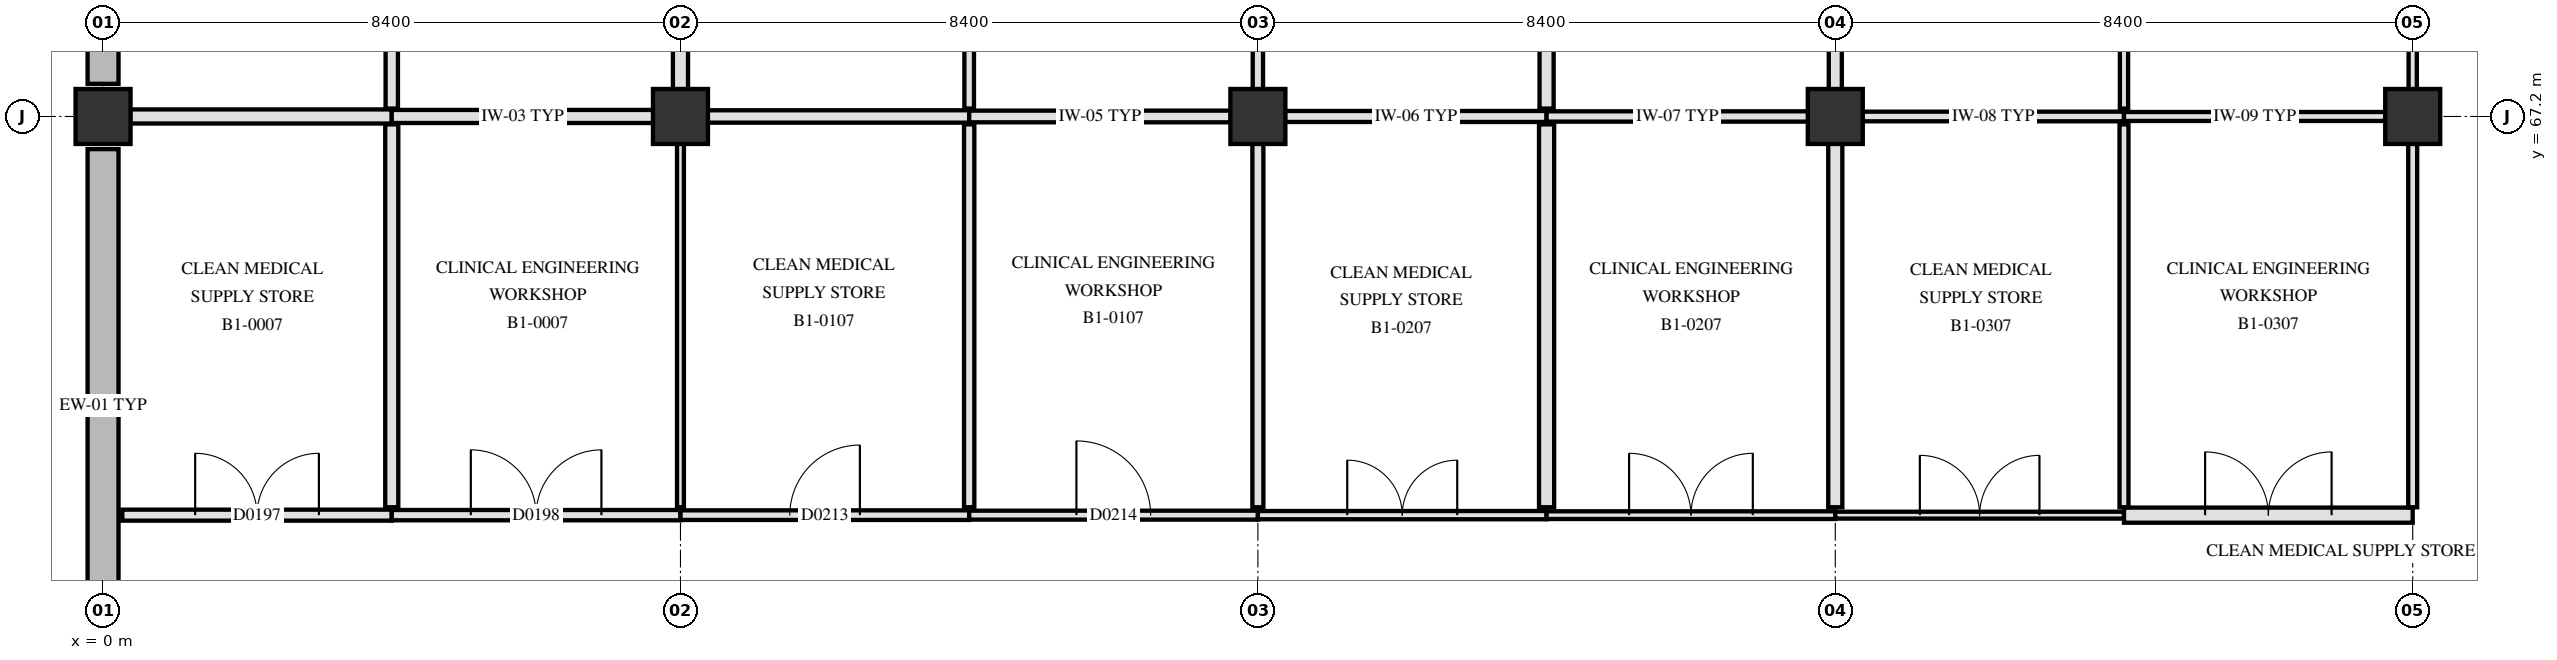
"""IFC4 building model, lengths in metres.
Left out: names, types, materials, properties, quantities, classifications, styles, units other than length and angle.
Written with IfcOpenShell. Run it as: python <this file> out.ifc"""

import sys

from ifc_helpers import new_model, si_unit, direction, frame, frame_2d, origin, origin_2d, place, context, subcontext, project, spatial, rectangle, extrude, element, fill, save


model = new_model("IFC4")
c1 = context("Model", 3, precision=1e-05, world=origin(), true_north=direction((0.0, 1.0)))
c2 = subcontext(c1, "Body", "Model", "MODEL_VIEW")
j1 = project(units=[si_unit("LENGTHUNIT", "METRE"), si_unit("PLANEANGLEUNIT", "RADIAN")], contexts=[c1])
p1 = place(None, origin())
s1 = spatial("IfcSite", under=j1, at=p1, CompositionType="ELEMENT")
p2 = place(p1, origin())
s2 = spatial("IfcBuilding", under=s1, at=p2, CompositionType="ELEMENT")
p3 = place(p2, frame((0.0, 0.0, -5.4)))
s3 = spatial("IfcBuildingStorey", under=s2, at=p3, CompositionType="ELEMENT", Elevation=-5.4)
for number, where, z_axis, x_axis in (
    (1, (0.0, 67.2, 0.0), (0.0, 0.0, 1.0), (1.0, 0.0, 0.0)),
    (2, (8.4, 67.2, 0.0), (0.0, 0.0, 1.0), (1.0, 0.0, 0.0)),
    (3, (16.8, 67.2, 0.0), (0.0, 0.0, 1.0), (1.0, 0.0, 0.0)),
    (4, (25.2, 67.2, 0.0), (0.0, 0.0, 1.0), (1.0, 0.0, 0.0)),
    (5, (33.6, 67.2, 0.0), (0.0, 0.0, 1.0), (1.0, 0.0, 0.0)),
):
    element("IfcColumn", number, at=place(p3, frame(where, z_axis=z_axis, x_axis=x_axis)), inside=s3, PredefinedType="COLUMN", context=c2, shape_type="SweptSolid", body=[
        extrude(rectangle(XDim=0.8, YDim=0.8, at=origin_2d()), origin(), (0.0, 0.0, 1.0), 5.4),
    ])
p4 = place(p3, frame((0.0, 59.275, 0.0), z_axis=(0.0, 0.0, 1.0), x_axis=(0.0, 1.0, 0.0)))
e6 = element("IfcWall", 6, at=p4, inside=s3, PredefinedType="SOLIDWALL", context=c2, shape_type="SweptSolid", body=[
    extrude(rectangle(XDim=7.45, YDim=0.45, at=frame_2d((3.725, 0.0))), origin(), (0.0, 0.0, 1.0), 5.08),
])
p5 = place(p3, frame((0.0, 67.675, 0.0), z_axis=(0.0, 0.0, 1.0), x_axis=(0.0, 1.0, 0.0)))
e7 = element("IfcWall", 7, at=p5, inside=s3, PredefinedType="SOLIDWALL", context=c2, shape_type="SweptSolid", body=[
    extrude(rectangle(XDim=7.45, YDim=0.45, at=frame_2d((3.725, 0.0))), origin(), (0.0, 0.0, 1.0), 5.08),
])
p6 = place(p3, frame((0.28, 61.4, 0.0), z_axis=(0.0, 0.0, 1.0), x_axis=(1.0, 0.0, 0.0)))
e8 = element("IfcWall", 8, at=p6, inside=s3, PredefinedType="PARTITIONING", context=c2, shape_type="SweptSolid", body=[
    extrude(rectangle(XDim=3.92, YDim=0.16, at=frame_2d((1.96, 0.0))), origin(), (0.0, 0.0, 1.0), 5.07),
])
p7 = place(p6, frame((1.06, 0.0, 0.0)))
e9 = element("IfcOpeningElement", 9, at=p7, cuts=e8, PredefinedType="OPENING", context=c2, shape_type="SweptSolid", body=[
    extrude(rectangle(XDim=1.8, YDim=2.25, at=frame_2d((0.9, 1.125))), frame((0.0, 0.09, 0.0), z_axis=(0.0, -1.0, 0.0), x_axis=(1.0, 0.0, 0.0)), (0.0, 0.0, 1.0), 0.18),
])
p8 = place(p3, frame((4.2, 61.4, 0.0), z_axis=(0.0, 0.0, 1.0), x_axis=(1.0, 0.0, 0.0)))
e10 = element("IfcWall", 10, at=p8, inside=s3, PredefinedType="PARTITIONING", context=c2, shape_type="SweptSolid", body=[
    extrude(rectangle(XDim=4.2, YDim=0.15, at=frame_2d((2.1, 0.0))), origin(), (0.0, 0.0, 1.0), 4.47),
])
p9 = place(p8, frame((1.15, 0.0, 0.0)))
e11 = element("IfcOpeningElement", 11, at=p9, cuts=e10, PredefinedType="OPENING", context=c2, shape_type="SweptSolid", body=[
    extrude(rectangle(XDim=1.9, YDim=2.3, at=frame_2d((0.95, 1.15))), frame((0.0, 0.085, 0.0), z_axis=(0.0, -1.0, 0.0), x_axis=(1.0, 0.0, 0.0)), (0.0, 0.0, 1.0), 0.17),
])
p10 = place(p3, frame((8.4, 61.4, 0.0), z_axis=(0.0, 0.0, 1.0), x_axis=(1.0, 0.0, 0.0)))
e12 = element("IfcWall", 12, at=p10, inside=s3, PredefinedType="PARTITIONING", context=c2, shape_type="SweptSolid", body=[
    extrude(rectangle(XDim=4.2, YDim=0.14, at=frame_2d((2.1, 0.0))), origin(), (0.0, 0.0, 1.0), 4.47),
])
p11 = place(p10, frame((1.59, 0.0, 0.0)))
e13 = element("IfcOpeningElement", 13, at=p11, cuts=e12, PredefinedType="OPENING", context=c2, shape_type="SweptSolid", body=[
    extrude(rectangle(XDim=1.02, YDim=2.12, at=frame_2d((0.51, 1.06))), frame((0.0, 0.08, 0.0), z_axis=(0.0, -1.0, 0.0), x_axis=(1.0, 0.0, 0.0)), (0.0, 0.0, 1.0), 0.16),
])
p12 = place(p3, frame((12.6, 61.4, 0.0), z_axis=(0.0, 0.0, 1.0), x_axis=(1.0, 0.0, 0.0)))
e14 = element("IfcWall", 14, at=p12, inside=s3, PredefinedType="PARTITIONING", context=c2, shape_type="SweptSolid", body=[
    extrude(rectangle(XDim=4.2, YDim=0.13, at=frame_2d((2.1, 0.0))), origin(), (0.0, 0.0, 1.0), 4.47),
])
p13 = place(p12, frame((1.56, 0.0, 0.0)))
e15 = element("IfcOpeningElement", 15, at=p13, cuts=e14, PredefinedType="OPENING", context=c2, shape_type="SweptSolid", body=[
    extrude(rectangle(XDim=1.08, YDim=2.12, at=frame_2d((0.54, 1.06))), frame((0.0, 0.075, 0.0), z_axis=(0.0, -1.0, 0.0), x_axis=(1.0, 0.0, 0.0)), (0.0, 0.0, 1.0), 0.15),
])
p14 = place(p3, frame((16.8, 61.4, 0.0), z_axis=(0.0, 0.0, 1.0), x_axis=(1.0, 0.0, 0.0)))
e16 = element("IfcWall", 16, at=p14, inside=s3, PredefinedType="PARTITIONING", context=c2, shape_type="SweptSolid", body=[
    extrude(rectangle(XDim=4.2, YDim=0.12, at=frame_2d((2.1, 0.0))), origin(), (0.0, 0.0, 1.0), 4.47),
])
p15 = place(p14, frame((1.3, 0.0, 0.0)))
e17 = element("IfcOpeningElement", 17, at=p15, cuts=e16, PredefinedType="OPENING", context=c2, shape_type="SweptSolid", body=[
    extrude(rectangle(XDim=1.6, YDim=2.25, at=frame_2d((0.8, 1.125))), frame((0.0, 0.07, 0.0), z_axis=(0.0, -1.0, 0.0), x_axis=(1.0, 0.0, 0.0)), (0.0, 0.0, 1.0), 0.14),
])
p16 = place(p3, frame((21.0, 61.4, 0.0), z_axis=(0.0, 0.0, 1.0), x_axis=(1.0, 0.0, 0.0)))
e18 = element("IfcWall", 18, at=p16, inside=s3, PredefinedType="PARTITIONING", context=c2, shape_type="SweptSolid", body=[
    extrude(rectangle(XDim=4.2, YDim=0.112, at=frame_2d((2.1, 0.0))), origin(), (0.0, 0.0, 1.0), 4.47),
])
p17 = place(p16, frame((1.2, 0.0, 0.0)))
e19 = element("IfcOpeningElement", 19, at=p17, cuts=e18, PredefinedType="OPENING", context=c2, shape_type="SweptSolid", body=[
    extrude(rectangle(XDim=1.8, YDim=2.25, at=frame_2d((0.9, 1.125))), frame((0.0, 0.066, 0.0), z_axis=(0.0, -1.0, 0.0), x_axis=(1.0, 0.0, 0.0)), (0.0, 0.0, 1.0), 0.132),
])
p18 = place(p3, frame((25.2, 61.4, 0.0), z_axis=(0.0, 0.0, 1.0), x_axis=(1.0, 0.0, 0.0)))
e20 = element("IfcWall", 20, at=p18, inside=s3, PredefinedType="PARTITIONING", context=c2, shape_type="SweptSolid", body=[
    extrude(rectangle(XDim=4.2, YDim=0.1, at=frame_2d((2.1, 0.0))), origin(), (0.0, 0.0, 1.0), 4.47),
])
p19 = place(p18, frame((1.23, 0.0, 0.0)))
e21 = element("IfcOpeningElement", 21, at=p19, cuts=e20, PredefinedType="OPENING", context=c2, shape_type="SweptSolid", body=[
    extrude(rectangle(XDim=1.74, YDim=2.24, at=frame_2d((0.87, 1.12))), frame((0.0, 0.06, 0.0), z_axis=(0.0, -1.0, 0.0), x_axis=(1.0, 0.0, 0.0)), (0.0, 0.0, 1.0), 0.12),
])
p20 = place(p3, frame((29.4, 61.4, 0.0), z_axis=(0.0, 0.0, 1.0), x_axis=(1.0, 0.0, 0.0)))
e22 = element("IfcWall", 22, at=p20, inside=s3, PredefinedType="PARTITIONING", context=c2, shape_type="SweptSolid", body=[
    extrude(rectangle(XDim=4.2, YDim=0.22, at=frame_2d((2.1, 0.0))), origin(), (0.0, 0.0, 1.0), 4.47),
])
p21 = place(p20, frame((1.18, 0.0, 0.0)))
e23 = element("IfcOpeningElement", 23, at=p21, cuts=e22, PredefinedType="OPENING", context=c2, shape_type="SweptSolid", body=[
    extrude(rectangle(XDim=1.84, YDim=2.28, at=frame_2d((0.92, 1.14))), frame((0.0, 0.12, 0.0), z_axis=(0.0, -1.0, 0.0), x_axis=(1.0, 0.0, 0.0)), (0.0, 0.0, 1.0), 0.24),
])
p22 = place(p3, frame((0.395, 67.2, 0.0), z_axis=(0.0, 0.0, 1.0), x_axis=(1.0, 0.0, 0.0)))
e24 = element("IfcWall", 24, at=p22, inside=s3, PredefinedType="PARTITIONING", context=c2, shape_type="SweptSolid", body=[
    extrude(rectangle(XDim=3.805, YDim=0.205, at=frame_2d((1.902, 0.0))), origin(), (0.0, 0.0, 1.0), 4.42),
])
p23 = place(p3, frame((4.2, 67.2, 0.0), z_axis=(0.0, 0.0, 1.0), x_axis=(1.0, 0.0, 0.0)))
e25 = element("IfcWall", 25, at=p23, inside=s3, PredefinedType="PARTITIONING", context=c2, shape_type="SweptSolid", body=[
    extrude(rectangle(XDim=3.805, YDim=0.19, at=frame_2d((1.902, 0.0))), origin(), (0.0, 0.0, 1.0), 4.42),
])
p24 = place(p3, frame((8.795, 67.2, 0.0), z_axis=(0.0, 0.0, 1.0), x_axis=(1.0, 0.0, 0.0)))
e26 = element("IfcWall", 26, at=p24, inside=s3, PredefinedType="PARTITIONING", context=c2, shape_type="SweptSolid", body=[
    extrude(rectangle(XDim=3.805, YDim=0.18, at=frame_2d((1.903, 0.0))), origin(), (0.0, 0.0, 1.0), 4.42),
])
p25 = place(p3, frame((12.6, 67.2, 0.0), z_axis=(0.0, 0.0, 1.0), x_axis=(1.0, 0.0, 0.0)))
e27 = element("IfcWall", 27, at=p25, inside=s3, PredefinedType="PARTITIONING", context=c2, shape_type="SweptSolid", body=[
    extrude(rectangle(XDim=3.805, YDim=0.17, at=frame_2d((1.902, 0.0))), origin(), (0.0, 0.0, 1.0), 4.42),
])
p26 = place(p3, frame((17.195, 67.2, 0.0), z_axis=(0.0, 0.0, 1.0), x_axis=(1.0, 0.0, 0.0)))
e28 = element("IfcWall", 28, at=p26, inside=s3, PredefinedType="PARTITIONING", context=c2, shape_type="SweptSolid", body=[
    extrude(rectangle(XDim=3.805, YDim=0.16, at=frame_2d((1.902, 0.0))), origin(), (0.0, 0.0, 1.0), 4.42),
])
p27 = place(p3, frame((21.0, 67.2, 0.0), z_axis=(0.0, 0.0, 1.0), x_axis=(1.0, 0.0, 0.0)))
e29 = element("IfcWall", 29, at=p27, inside=s3, PredefinedType="PARTITIONING", context=c2, shape_type="SweptSolid", body=[
    extrude(rectangle(XDim=3.805, YDim=0.15, at=frame_2d((1.902, 0.0))), origin(), (0.0, 0.0, 1.0), 4.42),
])
p28 = place(p3, frame((25.595, 67.2, 0.0), z_axis=(0.0, 0.0, 1.0), x_axis=(1.0, 0.0, 0.0)))
e30 = element("IfcWall", 30, at=p28, inside=s3, PredefinedType="PARTITIONING", context=c2, shape_type="SweptSolid", body=[
    extrude(rectangle(XDim=3.805, YDim=0.14, at=frame_2d((1.902, 0.0))), origin(), (0.0, 0.0, 1.0), 4.42),
])
p29 = place(p3, frame((29.4, 67.2, 0.0), z_axis=(0.0, 0.0, 1.0), x_axis=(1.0, 0.0, 0.0)))
e31 = element("IfcWall", 31, at=p29, inside=s3, PredefinedType="PARTITIONING", context=c2, shape_type="SweptSolid", body=[
    extrude(rectangle(XDim=3.805, YDim=0.13, at=frame_2d((1.903, 0.0))), origin(), (0.0, 0.0, 1.0), 4.42),
])
p30 = place(p3, frame((4.2, 61.515, 0.0), z_axis=(0.0, 0.0, 1.0), x_axis=(0.0, 1.0, 0.0)))
e32 = element("IfcWall", 32, at=p30, inside=s3, PredefinedType="PARTITIONING", context=c2, shape_type="SweptSolid", body=[
    extrude(rectangle(XDim=5.57, YDim=0.19, at=frame_2d((2.785, 0.0))), origin(), (0.0, 0.0, 1.0), 4.42),
])
p31 = place(p3, frame((4.2, 67.315, 0.0), z_axis=(0.0, 0.0, 1.0), x_axis=(0.0, 1.0, 0.0)))
e33 = element("IfcWall", 33, at=p31, inside=s3, PredefinedType="PARTITIONING", context=c2, shape_type="SweptSolid", body=[
    extrude(rectangle(XDim=8.17, YDim=0.18, at=frame_2d((4.085, 0.0))), origin(), (0.0, 0.0, 1.0), 4.42),
])
p32 = place(p3, frame((8.4, 61.515, 0.0), z_axis=(0.0, 0.0, 1.0), x_axis=(0.0, 1.0, 0.0)))
e34 = element("IfcWall", 34, at=p32, inside=s3, PredefinedType="PARTITIONING", context=c2, shape_type="SweptSolid", body=[
    extrude(rectangle(XDim=5.29, YDim=0.1, at=frame_2d((2.645, 0.0))), origin(), (0.0, 0.0, 1.0), 4.47),
])
p33 = place(p3, frame((8.4, 67.595, 0.0), z_axis=(0.0, 0.0, 1.0), x_axis=(0.0, 1.0, 0.0)))
e35 = element("IfcWall", 35, at=p33, inside=s3, PredefinedType="PARTITIONING", context=c2, shape_type="SweptSolid", body=[
    extrude(rectangle(XDim=7.61, YDim=0.22, at=frame_2d((3.805, 0.0))), origin(), (0.0, 0.0, 1.0), 4.47),
])
p34 = place(p3, frame((12.6, 61.515, 0.0), z_axis=(0.0, 0.0, 1.0), x_axis=(0.0, 1.0, 0.0)))
e36 = element("IfcWall", 36, at=p34, inside=s3, PredefinedType="PARTITIONING", context=c2, shape_type="SweptSolid", body=[
    extrude(rectangle(XDim=5.57, YDim=0.15, at=frame_2d((2.785, 0.0))), origin(), (0.0, 0.0, 1.0), 4.42),
])
p35 = place(p3, frame((12.6, 67.315, 0.0), z_axis=(0.0, 0.0, 1.0), x_axis=(0.0, 1.0, 0.0)))
e37 = element("IfcWall", 37, at=p35, inside=s3, PredefinedType="PARTITIONING", context=c2, shape_type="SweptSolid", body=[
    extrude(rectangle(XDim=8.17, YDim=0.14, at=frame_2d((4.085, 0.0))), origin(), (0.0, 0.0, 1.0), 4.42),
])
p36 = place(p3, frame((16.8, 61.515, 0.0), z_axis=(0.0, 0.0, 1.0), x_axis=(0.0, 1.0, 0.0)))
e38 = element("IfcWall", 38, at=p36, inside=s3, PredefinedType="PARTITIONING", context=c2, shape_type="SweptSolid", body=[
    extrude(rectangle(XDim=5.29, YDim=0.16, at=frame_2d((2.645, 0.0))), origin(), (0.0, 0.0, 1.0), 4.47),
])
p37 = place(p3, frame((16.8, 67.595, 0.0), z_axis=(0.0, 0.0, 1.0), x_axis=(0.0, 1.0, 0.0)))
e39 = element("IfcWall", 39, at=p37, inside=s3, PredefinedType="PARTITIONING", context=c2, shape_type="SweptSolid", body=[
    extrude(rectangle(XDim=7.61, YDim=0.15, at=frame_2d((3.805, 0.0))), origin(), (0.0, 0.0, 1.0), 4.47),
])
p38 = place(p3, frame((21.0, 61.515, 0.0), z_axis=(0.0, 0.0, 1.0), x_axis=(0.0, 1.0, 0.0)))
e40 = element("IfcWall", 40, at=p38, inside=s3, PredefinedType="PARTITIONING", context=c2, shape_type="SweptSolid", body=[
    extrude(rectangle(XDim=5.57, YDim=0.22, at=frame_2d((2.785, 0.0))), origin(), (0.0, 0.0, 1.0), 4.42),
])
p39 = place(p3, frame((21.0, 67.315, 0.0), z_axis=(0.0, 0.0, 1.0), x_axis=(0.0, 1.0, 0.0)))
e41 = element("IfcWall", 41, at=p39, inside=s3, PredefinedType="PARTITIONING", context=c2, shape_type="SweptSolid", body=[
    extrude(rectangle(XDim=8.17, YDim=0.205, at=frame_2d((4.085, 0.0))), origin(), (0.0, 0.0, 1.0), 4.42),
])
p40 = place(p3, frame((25.2, 61.515, 0.0), z_axis=(0.0, 0.0, 1.0), x_axis=(0.0, 1.0, 0.0)))
e42 = element("IfcWall", 42, at=p40, inside=s3, PredefinedType="PARTITIONING", context=c2, shape_type="SweptSolid", body=[
    extrude(rectangle(XDim=5.29, YDim=0.205, at=frame_2d((2.645, 0.0))), origin(), (0.0, 0.0, 1.0), 4.47),
])
p41 = place(p3, frame((25.2, 67.595, 0.0), z_axis=(0.0, 0.0, 1.0), x_axis=(0.0, 1.0, 0.0)))
e43 = element("IfcWall", 43, at=p41, inside=s3, PredefinedType="PARTITIONING", context=c2, shape_type="SweptSolid", body=[
    extrude(rectangle(XDim=7.61, YDim=0.19, at=frame_2d((3.805, 0.0))), origin(), (0.0, 0.0, 1.0), 4.47),
])
p42 = place(p3, frame((29.4, 61.515, 0.0), z_axis=(0.0, 0.0, 1.0), x_axis=(0.0, 1.0, 0.0)))
e44 = element("IfcWall", 44, at=p42, inside=s3, PredefinedType="PARTITIONING", context=c2, shape_type="SweptSolid", body=[
    extrude(rectangle(XDim=5.57, YDim=0.13, at=frame_2d((2.785, 0.0))), origin(), (0.0, 0.0, 1.0), 4.42),
])
p43 = place(p3, frame((29.4, 67.315, 0.0), z_axis=(0.0, 0.0, 1.0), x_axis=(0.0, 1.0, 0.0)))
e45 = element("IfcWall", 45, at=p43, inside=s3, PredefinedType="PARTITIONING", context=c2, shape_type="SweptSolid", body=[
    extrude(rectangle(XDim=8.17, YDim=0.12, at=frame_2d((4.085, 0.0))), origin(), (0.0, 0.0, 1.0), 4.42),
])
p44 = place(p3, frame((33.6, 61.515, 0.0), z_axis=(0.0, 0.0, 1.0), x_axis=(0.0, 1.0, 0.0)))
e46 = element("IfcWall", 46, at=p44, inside=s3, PredefinedType="PARTITIONING", context=c2, shape_type="SweptSolid", body=[
    extrude(rectangle(XDim=5.29, YDim=0.13, at=frame_2d((2.645, 0.0))), origin(), (0.0, 0.0, 1.0), 4.47),
])
p45 = place(p3, frame((33.6, 67.595, 0.0), z_axis=(0.0, 0.0, 1.0), x_axis=(0.0, 1.0, 0.0)))
e47 = element("IfcWall", 47, at=p45, inside=s3, PredefinedType="PARTITIONING", context=c2, shape_type="SweptSolid", body=[
    extrude(rectangle(XDim=7.61, YDim=0.12, at=frame_2d((3.805, 0.0))), origin(), (0.0, 0.0, 1.0), 4.47),
])
p46 = place(p7, origin())
e48 = element("IfcDoor", 48, at=p46, inside=s3, OperationType="DOUBLE_SWING_RIGHT", PredefinedType="DOOR", context=c2, shape_type="SweptSolid", body=[
    extrude(rectangle(XDim=1.8, YDim=2.25, at=frame_2d((0.9, 1.125))), frame((0.0, 0.025, 0.0), z_axis=(0.0, -1.0, 0.0), x_axis=(1.0, 0.0, 0.0)), (0.0, 0.0, 1.0), 0.05),
])
fill(e9, e48)
p47 = place(p9, origin())
e49 = element("IfcDoor", 49, at=p47, inside=s3, OperationType="DOUBLE_SWING_LEFT", PredefinedType="DOOR", context=c2, shape_type="SweptSolid", body=[
    extrude(rectangle(XDim=1.9, YDim=2.3, at=frame_2d((0.95, 1.15))), frame((0.0, 0.025, 0.0), z_axis=(0.0, -1.0, 0.0), x_axis=(1.0, 0.0, 0.0)), (0.0, 0.0, 1.0), 0.05),
])
fill(e11, e49)
p48 = place(p11, origin())
e50 = element("IfcDoor", 50, at=p48, inside=s3, OperationType="SINGLE_SWING_RIGHT", PredefinedType="DOOR", context=c2, shape_type="SweptSolid", body=[
    extrude(rectangle(XDim=1.02, YDim=2.12, at=frame_2d((0.51, 1.06))), frame((0.0, 0.025, 0.0), z_axis=(0.0, -1.0, 0.0), x_axis=(1.0, 0.0, 0.0)), (0.0, 0.0, 1.0), 0.05),
])
fill(e13, e50)
p49 = place(p13, origin())
e51 = element("IfcDoor", 51, at=p49, inside=s3, OperationType="SINGLE_SWING_LEFT", PredefinedType="DOOR", context=c2, shape_type="SweptSolid", body=[
    extrude(rectangle(XDim=1.08, YDim=2.12, at=frame_2d((0.54, 1.06))), frame((0.0, 0.025, 0.0), z_axis=(0.0, -1.0, 0.0), x_axis=(1.0, 0.0, 0.0)), (0.0, 0.0, 1.0), 0.05),
])
fill(e15, e51)
p50 = place(p15, origin())
e52 = element("IfcDoor", 52, at=p50, inside=s3, OperationType="DOUBLE_SWING_LEFT", PredefinedType="DOOR", context=c2, shape_type="SweptSolid", body=[
    extrude(rectangle(XDim=1.6, YDim=2.25, at=frame_2d((0.8, 1.125))), frame((0.0, 0.025, 0.0), z_axis=(0.0, -1.0, 0.0), x_axis=(1.0, 0.0, 0.0)), (0.0, 0.0, 1.0), 0.05),
])
fill(e17, e52)
p51 = place(p17, origin())
e53 = element("IfcDoor", 53, at=p51, inside=s3, OperationType="DOUBLE_SWING_RIGHT", PredefinedType="DOOR", context=c2, shape_type="SweptSolid", body=[
    extrude(rectangle(XDim=1.8, YDim=2.25, at=frame_2d((0.9, 1.125))), frame((0.0, 0.025, 0.0), z_axis=(0.0, -1.0, 0.0), x_axis=(1.0, 0.0, 0.0)), (0.0, 0.0, 1.0), 0.05),
])
fill(e19, e53)
p52 = place(p19, origin())
e54 = element("IfcDoor", 54, at=p52, inside=s3, OperationType="DOUBLE_SWING_RIGHT", PredefinedType="DOOR", context=c2, shape_type="SweptSolid", body=[
    extrude(rectangle(XDim=1.74, YDim=2.24, at=frame_2d((0.87, 1.12))), frame((0.0, 0.025, 0.0), z_axis=(0.0, -1.0, 0.0), x_axis=(1.0, 0.0, 0.0)), (0.0, 0.0, 1.0), 0.05),
])
fill(e21, e54)
p53 = place(p21, origin())
e55 = element("IfcDoor", 55, at=p53, inside=s3, OperationType="DOUBLE_SWING_LEFT", PredefinedType="DOOR", context=c2, shape_type="SweptSolid", body=[
    extrude(rectangle(XDim=1.84, YDim=2.28, at=frame_2d((0.92, 1.14))), frame((0.0, 0.025, 0.0), z_axis=(0.0, -1.0, 0.0), x_axis=(1.0, 0.0, 0.0)), (0.0, 0.0, 1.0), 0.05),
])
fill(e23, e55)
save(model, sys.argv[1])
